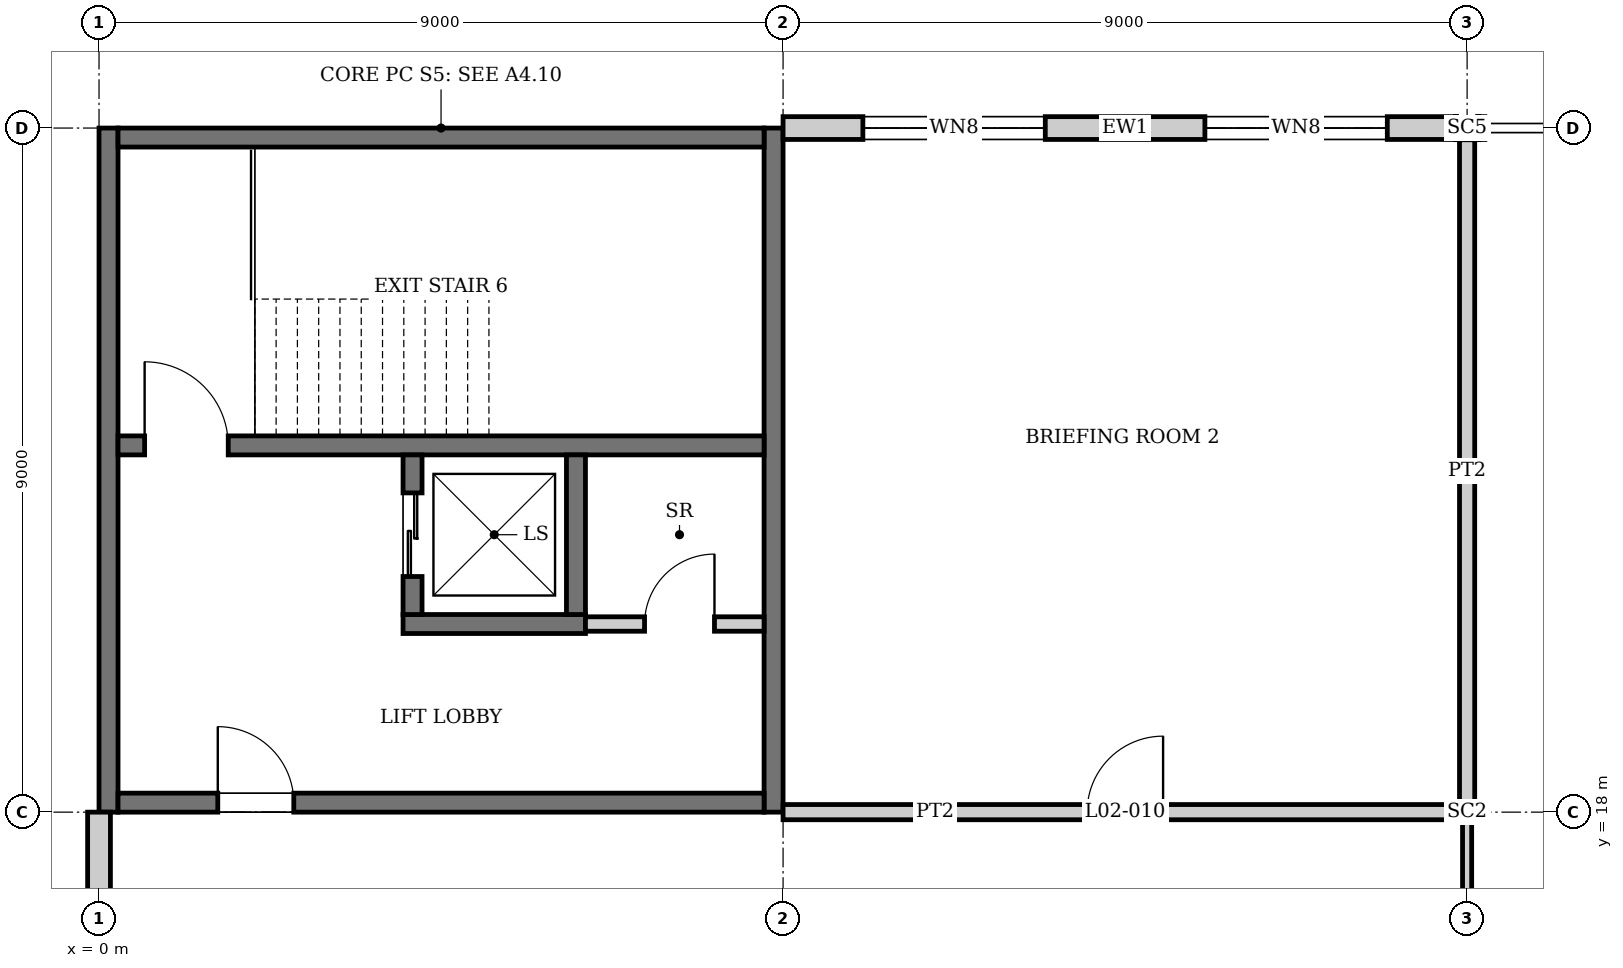
"""IFC4 building model, lengths in metres.
Left out: names, types, materials, properties, quantities, classifications, styles, units other than length and angle.
Written with IfcOpenShell. Run it as: python <this file> out.ifc"""

import sys

from ifc_helpers import new_model, si_unit, direction, frame, frame_2d, origin, origin_2d, place, context, subcontext, project, spatial, rectangle, i_section, extrude, element, fill, save


model = new_model("IFC4")
c1 = context("Model", 3, precision=1e-05, world=origin(), true_north=direction((0.0, 1.0)))
c2 = subcontext(c1, "Body", "Model", "MODEL_VIEW")
j1 = project(units=[si_unit("LENGTHUNIT", "METRE"), si_unit("PLANEANGLEUNIT", "RADIAN")], contexts=[c1])
p1 = place(None, origin())
s1 = spatial("IfcSite", under=j1, at=p1, CompositionType="ELEMENT")
p2 = place(p1, origin())
s2 = spatial("IfcBuilding", under=s1, at=p2, CompositionType="ELEMENT")
p3 = place(p2, frame((0.0, 0.0, 10.5)))
s3 = spatial("IfcBuildingStorey", under=s2, at=p3, CompositionType="ELEMENT", Elevation=10.5)
p4 = place(p3, frame((18.0, 18.0, 0.0), z_axis=(0.0, 0.0, 1.0), x_axis=(0.0, 1.0, 0.0)))
e1 = element("IfcColumn", 1, at=p4, inside=s3, PredefinedType="COLUMN", context=c2, shape_type="SweptSolid", body=[
    extrude(i_section(OverallWidth=0.256, OverallDepth=0.26, WebThickness=0.01, FlangeThickness=0.017, at=origin_2d()), origin(), (0.0, 0.0, 1.0), 4.5),
])
p5 = place(p3, frame((18.0, 27.0, 0.0), z_axis=(0.0, 0.0, 1.0), x_axis=(0.0, 1.0, 0.0)))
e2 = element("IfcColumn", 2, at=p5, inside=s3, PredefinedType="COLUMN", context=c2, shape_type="SweptSolid", body=[
    extrude(i_section(OverallWidth=0.305, OverallDepth=0.308, WebThickness=0.01, FlangeThickness=0.015, at=origin_2d()), origin(), (0.0, 0.0, 1.0), 4.5),
])
for number, where, z_axis, x_axis in (
    (3, (0.125, 18.0, 0.0), (0.0, 0.0, 1.0), (0.0, 1.0, 0.0)),
    (4, (8.875, 18.0, 0.0), (0.0, 0.0, 1.0), (0.0, 1.0, 0.0)),
):
    element("IfcWall", number, at=place(p3, frame(where, z_axis=z_axis, x_axis=x_axis)), inside=s3, PredefinedType="SHEAR", context=c2, shape_type="SweptSolid", body=[
        extrude(rectangle(XDim=9.0, YDim=0.25, at=frame_2d((4.5, 0.0))), origin(), (0.0, 0.0, 1.0), 4.35),
    ])
p6 = place(p3, frame((0.25, 18.125, 0.0), z_axis=(0.0, 0.0, 1.0), x_axis=(1.0, 0.0, 0.0)))
e5 = element("IfcWall", 5, at=p6, inside=s3, PredefinedType="SHEAR", context=c2, shape_type="SweptSolid", body=[
    extrude(rectangle(XDim=8.5, YDim=0.25, at=frame_2d((4.25, 0.0))), origin(), (0.0, 0.0, 1.0), 4.35),
])
p7 = place(p6, frame((1.312, 0.0, 0.0)))
e6 = element("IfcOpeningElement", 6, at=p7, cuts=e5, PredefinedType="OPENING", context=c2, shape_type="SweptSolid", body=[
    extrude(rectangle(XDim=1.0, YDim=2.1, at=frame_2d((0.5, 1.05))), frame((0.0, 0.135, 0.0), z_axis=(0.0, -1.0, 0.0), x_axis=(1.0, 0.0, 0.0)), (0.0, 0.0, 1.0), 0.27),
])
p8 = place(p3, frame((0.25, 26.875, 0.0), z_axis=(0.0, 0.0, 1.0), x_axis=(1.0, 0.0, 0.0)))
e7 = element("IfcWall", 7, at=p8, inside=s3, PredefinedType="SHEAR", context=c2, shape_type="SweptSolid", body=[
    extrude(rectangle(XDim=8.5, YDim=0.25, at=frame_2d((4.25, 0.0))), origin(), (0.0, 0.0, 1.0), 4.35),
])
p9 = place(p3, frame((9.0, 27.0, 0.0), z_axis=(0.0, 0.0, 1.0), x_axis=(1.0, 0.0, 0.0)))
e8 = element("IfcWall", 8, at=p9, inside=s3, PredefinedType="SOLIDWALL", context=c2, shape_type="SweptSolid", body=[
    extrude(rectangle(XDim=8.846, YDim=0.3, at=frame_2d((4.423, 0.0))), origin(), (0.0, 0.0, 1.0), 3.991),
])
p10 = place(p9, frame((1.05, 0.0, 0.9)))
e9 = element("IfcOpeningElement", 9, at=p10, cuts=e8, PredefinedType="OPENING", context=c2, shape_type="SweptSolid", body=[
    extrude(rectangle(XDim=2.4, YDim=2.1, at=frame_2d((1.2, 1.05))), frame((0.0, 0.16, 0.0), z_axis=(0.0, -1.0, 0.0), x_axis=(1.0, 0.0, 0.0)), (0.0, 0.0, 1.0), 0.32),
])
p11 = place(p9, frame((5.55, 0.0, 0.9)))
e10 = element("IfcOpeningElement", 10, at=p11, cuts=e8, PredefinedType="OPENING", context=c2, shape_type="SweptSolid", body=[
    extrude(rectangle(XDim=2.4, YDim=2.1, at=frame_2d((1.2, 1.05))), frame((0.0, 0.16, 0.0), z_axis=(0.0, -1.0, 0.0), x_axis=(1.0, 0.0, 0.0)), (0.0, 0.0, 1.0), 0.32),
])
p12 = place(p3, frame((0.0, 9.127, 0.0), z_axis=(0.0, 0.0, 1.0), x_axis=(0.0, 1.0, 0.0)))
e11 = element("IfcWall", 11, at=p12, inside=s3, PredefinedType="SOLIDWALL", context=c2, shape_type="SweptSolid", body=[
    extrude(rectangle(XDim=8.873, YDim=0.3, at=frame_2d((4.437, 0.0))), origin(), (0.0, 0.0, 1.0), 3.991),
])
p13 = place(p12, frame((1.223, 0.0, 0.9)))
e12 = element("IfcOpeningElement", 12, at=p13, cuts=e11, PredefinedType="OPENING", context=c2, shape_type="SweptSolid", body=[
    extrude(rectangle(XDim=1.8, YDim=2.4, at=frame_2d((0.9, 1.2))), frame((0.0, 0.16, 0.0), z_axis=(0.0, -1.0, 0.0), x_axis=(1.0, 0.0, 0.0)), (0.0, 0.0, 1.0), 0.32),
])
p14 = place(p12, frame((5.723, 0.0, 0.9)))
e13 = element("IfcOpeningElement", 13, at=p14, cuts=e11, PredefinedType="OPENING", context=c2, shape_type="SweptSolid", body=[
    extrude(rectangle(XDim=1.8, YDim=2.4, at=frame_2d((0.9, 1.2))), frame((0.0, 0.16, 0.0), z_axis=(0.0, -1.0, 0.0), x_axis=(1.0, 0.0, 0.0)), (0.0, 0.0, 1.0), 0.32),
])
p15 = place(p3, frame((0.25, 22.825, 0.0), z_axis=(0.0, 0.0, 1.0), x_axis=(1.0, 0.0, 0.0)))
e14 = element("IfcWall", 14, at=p15, inside=s3, PredefinedType="SOLIDWALL", context=c2, shape_type="SweptSolid", body=[
    extrude(rectangle(XDim=8.5, YDim=0.25, at=frame_2d((4.25, 0.0))), origin(), (0.0, 0.0, 1.0), 4.35),
])
p16 = place(p15, frame((0.35, 0.0, 0.0)))
e15 = element("IfcOpeningElement", 15, at=p16, cuts=e14, PredefinedType="OPENING", context=c2, shape_type="SweptSolid", body=[
    extrude(rectangle(XDim=1.1, YDim=2.1, at=frame_2d((0.55, 1.05))), frame((0.0, 0.135, 0.0), z_axis=(0.0, -1.0, 0.0), x_axis=(1.0, 0.0, 0.0)), (0.0, 0.0, 1.0), 0.27),
])
p17 = place(p3, frame((4.0, 20.475, 0.0), z_axis=(0.0, 0.0, 1.0), x_axis=(1.0, 0.0, 0.0)))
e16 = element("IfcWall", 16, at=p17, inside=s3, PredefinedType="SOLIDWALL", context=c2, shape_type="SweptSolid", body=[
    extrude(rectangle(XDim=2.4, YDim=0.25, at=frame_2d((1.2, 0.0))), origin(), (0.0, 0.0, 1.0), 4.35),
])
p18 = place(p3, frame((4.125, 20.6, 0.0), z_axis=(0.0, 0.0, 1.0), x_axis=(0.0, 1.0, 0.0)))
e17 = element("IfcWall", 17, at=p18, inside=s3, PredefinedType="SOLIDWALL", context=c2, shape_type="SweptSolid", body=[
    extrude(rectangle(XDim=2.1, YDim=0.25, at=frame_2d((1.05, 0.0))), origin(), (0.0, 0.0, 1.0), 4.35),
])
p19 = place(p18, frame((0.5, 0.0, 0.0)))
e18 = element("IfcOpeningElement", 18, at=p19, cuts=e17, PredefinedType="OPENING", context=c2, shape_type="SweptSolid", body=[
    extrude(rectangle(XDim=1.1, YDim=2.1, at=frame_2d((0.55, 1.05))), frame((0.0, 0.135, 0.0), z_axis=(0.0, -1.0, 0.0), x_axis=(1.0, 0.0, 0.0)), (0.0, 0.0, 1.0), 0.27),
])
p20 = place(p3, frame((6.275, 20.6, 0.0), z_axis=(0.0, 0.0, 1.0), x_axis=(0.0, 1.0, 0.0)))
e19 = element("IfcWall", 19, at=p20, inside=s3, PredefinedType="SOLIDWALL", context=c2, shape_type="SweptSolid", body=[
    extrude(rectangle(XDim=2.1, YDim=0.25, at=frame_2d((1.05, 0.0))), origin(), (0.0, 0.0, 1.0), 4.35),
])
p21 = place(p3, frame((9.0, 18.0, 0.0), z_axis=(0.0, 0.0, 1.0), x_axis=(1.0, 0.0, 0.0)))
e20 = element("IfcWall", 20, at=p21, inside=s3, PredefinedType="PARTITIONING", context=c2, shape_type="SweptSolid", body=[
    extrude(rectangle(XDim=8.87, YDim=0.2, at=frame_2d((4.435, 0.0))), origin(), (0.0, 0.0, 1.0), 3.822),
])
p22 = place(p21, frame((4.0, 0.0, 0.0)))
e21 = element("IfcOpeningElement", 21, at=p22, cuts=e20, PredefinedType="OPENING", context=c2, shape_type="SweptSolid", body=[
    extrude(rectangle(XDim=1.0, YDim=2.1, at=frame_2d((0.5, 1.05))), frame((0.0, 0.11, 0.0), z_axis=(0.0, -1.0, 0.0), x_axis=(1.0, 0.0, 0.0)), (0.0, 0.0, 1.0), 0.22),
])
p23 = place(p3, frame((6.4, 20.475, 0.0), z_axis=(0.0, 0.0, 1.0), x_axis=(1.0, 0.0, 0.0)))
e22 = element("IfcWall", 22, at=p23, inside=s3, PredefinedType="PARTITIONING", context=c2, shape_type="SweptSolid", body=[
    extrude(rectangle(XDim=2.35, YDim=0.19, at=frame_2d((1.175, 0.0))), origin(), (0.0, 0.0, 1.0), 4.35),
])
p24 = place(p23, frame((0.778, 0.0, 0.0)))
e23 = element("IfcOpeningElement", 23, at=p24, cuts=e22, PredefinedType="OPENING", context=c2, shape_type="SweptSolid", body=[
    extrude(rectangle(XDim=0.92, YDim=2.1, at=frame_2d((0.46, 1.05))), frame((0.0, 0.105, 0.0), z_axis=(0.0, -1.0, 0.0), x_axis=(1.0, 0.0, 0.0)), (0.0, 0.0, 1.0), 0.21),
])
p25 = place(p3, frame((18.0, 12.0, 0.0), z_axis=(0.0, 0.0, 1.0), x_axis=(0.0, 1.0, 0.0)))
e24 = element("IfcWall", 24, at=p25, inside=s3, PredefinedType="PARTITIONING", context=c2, shape_type="SweptSolid", body=[
    extrude(rectangle(XDim=5.87, YDim=0.12, at=frame_2d((2.935, 0.0))), origin(), (0.0, 0.0, 1.0), 4.35),
])
p26 = place(p3, frame((18.0, 18.13, 0.0), z_axis=(0.0, 0.0, 1.0), x_axis=(0.0, 1.0, 0.0)))
e25 = element("IfcWall", 25, at=p26, inside=s3, PredefinedType="PARTITIONING", context=c2, shape_type="SweptSolid", body=[
    extrude(rectangle(XDim=8.716, YDim=0.2, at=frame_2d((4.358, 0.0))), origin(), (0.0, 0.0, 1.0), 4.35),
])
p27 = place(p10, origin())
e26 = element("IfcWindow", 26, at=p27, inside=s3, PartitioningType="SINGLE_PANEL", PredefinedType="WINDOW", context=c2, shape_type="SweptSolid", body=[
    extrude(rectangle(XDim=2.4, YDim=2.1, at=frame_2d((1.2, 1.05))), frame((0.0, 0.03, 0.0), z_axis=(0.0, -1.0, 0.0), x_axis=(1.0, 0.0, 0.0)), (0.0, 0.0, 1.0), 0.06),
])
fill(e9, e26)
p28 = place(p11, origin())
e27 = element("IfcWindow", 27, at=p28, inside=s3, PartitioningType="SINGLE_PANEL", PredefinedType="WINDOW", context=c2, shape_type="SweptSolid", body=[
    extrude(rectangle(XDim=2.4, YDim=2.1, at=frame_2d((1.2, 1.05))), frame((0.0, 0.03, 0.0), z_axis=(0.0, -1.0, 0.0), x_axis=(1.0, 0.0, 0.0)), (0.0, 0.0, 1.0), 0.06),
])
fill(e10, e27)
p29 = place(p19, origin())
e28 = element("IfcDoor", 28, at=p29, inside=s3, OperationType="DOUBLE_DOOR_SLIDING", PredefinedType="DOOR", context=c2, shape_type="SweptSolid", body=[
    extrude(rectangle(XDim=1.1, YDim=2.1, at=frame_2d((0.55, 1.05))), frame((0.0, 0.025, 0.0), z_axis=(0.0, -1.0, 0.0), x_axis=(1.0, 0.0, 0.0)), (0.0, 0.0, 1.0), 0.05),
])
fill(e18, e28)
p30 = place(p22, origin())
e29 = element("IfcDoor", 29, at=p30, inside=s3, OperationType="SINGLE_SWING_RIGHT", PredefinedType="DOOR", context=c2, shape_type="SweptSolid", body=[
    extrude(rectangle(XDim=1.0, YDim=2.1, at=frame_2d((0.5, 1.05))), frame((0.0, 0.025, 0.0), z_axis=(0.0, -1.0, 0.0), x_axis=(1.0, 0.0, 0.0)), (0.0, 0.0, 1.0), 0.05),
])
fill(e21, e29)
p31 = place(p16, origin())
e30 = element("IfcDoor", 30, at=p31, inside=s3, OperationType="SINGLE_SWING_LEFT", PredefinedType="DOOR", context=c2, shape_type="SweptSolid", body=[
    extrude(rectangle(XDim=1.1, YDim=2.1, at=frame_2d((0.55, 1.05))), frame((0.0, 0.025, 0.0), z_axis=(0.0, -1.0, 0.0), x_axis=(1.0, 0.0, 0.0)), (0.0, 0.0, 1.0), 0.05),
])
fill(e15, e30)
p32 = place(p7, origin())
e31 = element("IfcDoor", 31, at=p32, inside=s3, OperationType="SINGLE_SWING_LEFT", PredefinedType="DOOR", context=c2, shape_type="SweptSolid", body=[
    extrude(rectangle(XDim=1.0, YDim=2.1, at=frame_2d((0.5, 1.05))), frame((0.0, 0.025, 0.0), z_axis=(0.0, -1.0, 0.0), x_axis=(1.0, 0.0, 0.0)), (0.0, 0.0, 1.0), 0.05),
])
fill(e6, e31)
p33 = place(p24, origin())
e32 = element("IfcDoor", 32, at=p33, inside=s3, OperationType="SINGLE_SWING_RIGHT", PredefinedType="DOOR", context=c2, shape_type="SweptSolid", body=[
    extrude(rectangle(XDim=0.92, YDim=2.1, at=frame_2d((0.46, 1.05))), frame((0.0, 0.025, 0.0), z_axis=(0.0, -1.0, 0.0), x_axis=(1.0, 0.0, 0.0)), (0.0, 0.0, 1.0), 0.05),
])
fill(e23, e32)
save(model, sys.argv[1])
